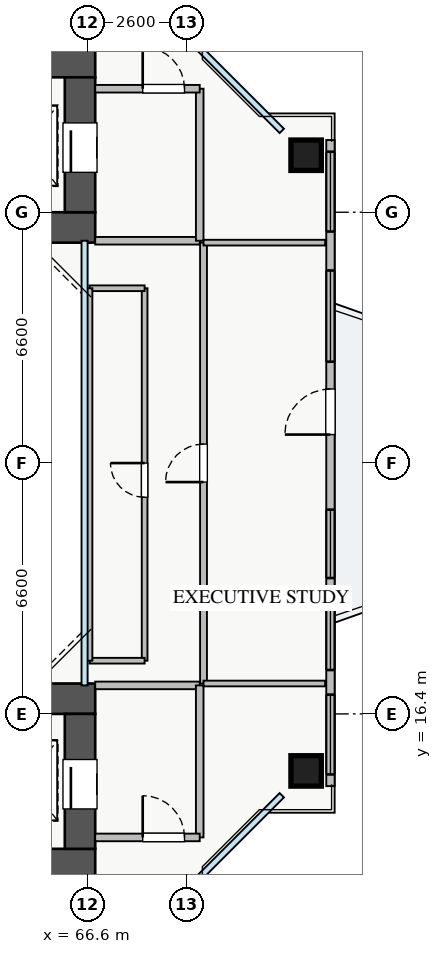
"""IFC4 building model, lengths in metres.
Left out: names, types, materials, properties, quantities, classifications, styles, units other than length and angle.
Written with IfcOpenShell. Run it as: python <this file> out.ifc"""

import sys

from ifc_helpers import new_model, si_unit, direction, frame, frame_2d, origin, origin_2d, place, context, subcontext, project, spatial, rectangle, extrude, source, transform, mapped, element, fill, save


model = new_model("IFC4")
c1 = context("Model", 3, precision=1e-05, world=origin(), true_north=direction((0.0, 1.0)))
c2 = subcontext(c1, "Body", "Model", "MODEL_VIEW")
j1 = project(units=[si_unit("LENGTHUNIT", "METRE"), si_unit("PLANEANGLEUNIT", "RADIAN")], contexts=[c1])
p1 = place(None, origin())
s1 = spatial("IfcSite", under=j1, at=p1, CompositionType="ELEMENT")
p2 = place(p1, origin())
s2 = spatial("IfcBuilding", under=s1, at=p2, CompositionType="ELEMENT")
p3 = place(p2, frame((0.0, 0.0, 79.5)))
s3 = spatial("IfcBuildingStorey", under=s2, at=p3, CompositionType="ELEMENT", Elevation=79.5)
p4 = place(p3, frame((54.2, 29.2, 0.0), z_axis=(0.0, 0.0, 1.0), x_axis=(1.0, 0.0, 0.0)))
e1 = element("IfcWall", 1, at=p4, inside=s3, PredefinedType="SHEAR", context=c2, shape_type="SweptSolid", body=[
    extrude(rectangle(XDim=12.6, YDim=0.8, at=frame_2d((6.3, 0.0))), origin(), (0.0, 0.0, 1.0), 3.25),
])
p5 = place(p3, frame((54.2, 33.55, 0.0), z_axis=(0.0, 0.0, 1.0), x_axis=(1.0, 0.0, 0.0)))
e2 = element("IfcWall", 2, at=p5, inside=s3, PredefinedType="SHEAR", context=c2, shape_type="SweptSolid", body=[
    extrude(rectangle(XDim=12.6, YDim=0.8, at=frame_2d((6.3, 0.0))), origin(), (0.0, 0.0, 1.0), 3.25),
])
p6 = place(p5, frame((8.2, 0.0, 0.0)))
e3 = element("IfcOpeningElement", 3, at=p6, cuts=e2, PredefinedType="OPENING", context=c2, shape_type="SweptSolid", body=[
    extrude(rectangle(XDim=1.1, YDim=2.05, at=frame_2d((0.55, 1.025))), frame((0.0, 0.41, 0.0), z_axis=(0.0, -1.0, 0.0), x_axis=(1.0, 0.0, 0.0)), (0.0, 0.0, 1.0), 0.82),
])
p7 = place(p3, frame((66.4, 29.6, 0.0), z_axis=(0.0, 0.0, 1.0), x_axis=(0.0, 1.0, 0.0)))
e4 = element("IfcWall", 4, at=p7, inside=s3, PredefinedType="SHEAR", context=c2, shape_type="SweptSolid", body=[
    extrude(rectangle(XDim=3.55, YDim=0.8, at=frame_2d((1.775, 0.0))), origin(), (0.0, 0.0, 1.0), 3.25),
])
p8 = place(p7, frame((1.05, 0.0, 0.0)))
e5 = element("IfcOpeningElement", 5, at=p8, cuts=e4, PredefinedType="OPENING", context=c2, shape_type="SweptSolid", body=[
    extrude(rectangle(XDim=1.3, YDim=2.05, at=frame_2d((0.65, 1.025))), frame((0.0, 0.41, 0.0), z_axis=(0.0, -1.0, 0.0), x_axis=(1.0, 0.0, 0.0)), (0.0, 0.0, 1.0), 0.82),
])
p9 = place(p3, frame((54.2, 12.45, 0.0), z_axis=(0.0, 0.0, 1.0), x_axis=(1.0, 0.0, 0.0)))
e6 = element("IfcWall", 6, at=p9, inside=s3, PredefinedType="SHEAR", context=c2, shape_type="SweptSolid", body=[
    extrude(rectangle(XDim=12.6, YDim=0.8, at=frame_2d((6.3, 0.0))), origin(), (0.0, 0.0, 1.0), 3.25),
])
p10 = place(p9, frame((8.2, 0.0, 0.0)))
e7 = element("IfcOpeningElement", 7, at=p10, cuts=e6, PredefinedType="OPENING", context=c2, shape_type="SweptSolid", body=[
    extrude(rectangle(XDim=1.1, YDim=2.05, at=frame_2d((0.55, 1.025))), frame((0.0, 0.41, 0.0), z_axis=(0.0, -1.0, 0.0), x_axis=(1.0, 0.0, 0.0)), (0.0, 0.0, 1.0), 0.82),
])
p11 = place(p3, frame((54.2, 16.8, 0.0), z_axis=(0.0, 0.0, 1.0), x_axis=(1.0, 0.0, 0.0)))
e8 = element("IfcWall", 8, at=p11, inside=s3, PredefinedType="SHEAR", context=c2, shape_type="SweptSolid", body=[
    extrude(rectangle(XDim=12.6, YDim=0.8, at=frame_2d((6.3, 0.0))), origin(), (0.0, 0.0, 1.0), 3.25),
])
p12 = place(p3, frame((66.4, 12.85, 0.0), z_axis=(0.0, 0.0, 1.0), x_axis=(0.0, 1.0, 0.0)))
e9 = element("IfcWall", 9, at=p12, inside=s3, PredefinedType="SHEAR", context=c2, shape_type="SweptSolid", body=[
    extrude(rectangle(XDim=3.55, YDim=0.8, at=frame_2d((1.775, 0.0))), origin(), (0.0, 0.0, 1.0), 3.25),
])
p13 = place(p12, frame((1.05, 0.0, 0.0)))
e10 = element("IfcOpeningElement", 10, at=p13, cuts=e9, PredefinedType="OPENING", context=c2, shape_type="SweptSolid", body=[
    extrude(rectangle(XDim=1.3, YDim=2.05, at=frame_2d((0.65, 1.025))), frame((0.0, 0.41, 0.0), z_axis=(0.0, -1.0, 0.0), x_axis=(1.0, 0.0, 0.0)), (0.0, 0.0, 1.0), 0.82),
])
m1 = source(origin(), c2, "Body", "SweptSolid", [
    extrude(rectangle(XDim=0.8, YDim=0.8, at=origin_2d()), origin(), (0.0, 0.0, 1.0), 3.25),
])
for number, where, z_axis, x_axis in (
    (11, (72.35, 14.9, 0.0), (0.0, 0.0, 1.0), (1.0, 0.0, 0.0)),
    (12, (72.35, 31.1, 0.0), (0.0, 0.0, 1.0), (1.0, 0.0, 0.0)),
):
    element("IfcColumn", number, at=place(p3, frame(where, z_axis=z_axis, x_axis=x_axis)), inside=s3, PredefinedType="COLUMN", context=c2, shape_type="MappedRepresentation", body=[
        mapped(m1, transform((0.0, 0.0, 0.0), x_axis=(1.0, 0.0, 0.0), y_axis=(0.0, 1.0, 0.0), z_axis=(0.0, 0.0, 1.0), scale=1.0)),
    ])
p14 = place(p3, frame((72.99, 14.5, 0.0), z_axis=(0.0, 0.0, 1.0), x_axis=(0.0, 1.0, 0.0)))
e13 = element("IfcWall", 13, at=p14, inside=s3, PredefinedType="STANDARD", context=c2, shape_type="SweptSolid", body=[
    extrude(rectangle(XDim=17.0, YDim=0.22, at=frame_2d((8.5, 0.0))), origin(), (0.0, 0.0, 1.0), 2.61),
])
p15 = place(p14, frame((9.25, 0.0, 0.0)))
e14 = element("IfcOpeningElement", 14, at=p15, cuts=e13, PredefinedType="OPENING", context=c2, shape_type="SweptSolid", body=[
    extrude(rectangle(XDim=1.2, YDim=2.1, at=frame_2d((0.6, 1.05))), frame((0.0, 0.12, 0.0), z_axis=(0.0, -1.0, 0.0), x_axis=(1.0, 0.0, 0.0)), (0.0, 0.0, 1.0), 0.24),
])
p16 = place(p14, frame((0.308, 0.0, 0.9)))
e15 = element("IfcOpeningElement", 15, at=p16, cuts=e13, PredefinedType="OPENING", context=c2, shape_type="SweptSolid", body=[
    extrude(rectangle(XDim=2.1, YDim=1.5, at=frame_2d((1.05, 0.75))), frame((0.0, 0.12, 0.0), z_axis=(0.0, -1.0, 0.0), x_axis=(1.0, 0.0, 0.0)), (0.0, 0.0, 1.0), 0.24),
])
p17 = place(p14, frame((5.475, 0.0, 0.9)))
e16 = element("IfcOpeningElement", 16, at=p17, cuts=e13, PredefinedType="OPENING", context=c2, shape_type="SweptSolid", body=[
    extrude(rectangle(XDim=1.8, YDim=1.45, at=frame_2d((0.9, 0.725))), frame((0.0, 0.12, 0.0), z_axis=(0.0, -1.0, 0.0), x_axis=(1.0, 0.0, 0.0)), (0.0, 0.0, 1.0), 0.24),
])
p18 = place(p14, frame((14.593, 0.0, 0.9)))
e17 = element("IfcOpeningElement", 17, at=p18, cuts=e13, PredefinedType="OPENING", context=c2, shape_type="SweptSolid", body=[
    extrude(rectangle(XDim=2.1, YDim=1.5, at=frame_2d((1.05, 0.75))), frame((0.0, 0.12, 0.0), z_axis=(0.0, -1.0, 0.0), x_axis=(1.0, 0.0, 0.0)), (0.0, 0.0, 1.0), 0.24),
])
p19 = place(p14, frame((3.055, 0.0, 0.9)))
e18 = element("IfcOpeningElement", 18, at=p19, cuts=e13, PredefinedType="OPENING", context=c2, shape_type="SweptSolid", body=[
    extrude(rectangle(XDim=2.1, YDim=1.5, at=frame_2d((1.05, 0.75))), frame((0.0, 0.12, 0.0), z_axis=(0.0, -1.0, 0.0), x_axis=(1.0, 0.0, 0.0)), (0.0, 0.0, 1.0), 0.24),
])
p20 = place(p14, frame((11.167, 0.0, 0.9)))
e19 = element("IfcOpeningElement", 19, at=p20, cuts=e13, PredefinedType="OPENING", context=c2, shape_type="SweptSolid", body=[
    extrude(rectangle(XDim=2.4, YDim=1.5, at=frame_2d((1.2, 0.75))), frame((0.0, 0.12, 0.0), z_axis=(0.0, -1.0, 0.0), x_axis=(1.0, 0.0, 0.0)), (0.0, 0.0, 1.0), 0.24),
])
p21 = place(p3, frame((66.8, 28.85, 0.0), z_axis=(0.0, 0.0, 1.0), x_axis=(1.0, 0.0, 0.0)))
e20 = element("IfcWall", 20, at=p21, inside=s3, PredefinedType="PARTITIONING", context=c2, shape_type="SweptSolid", body=[
    extrude(rectangle(XDim=2.75, YDim=0.2, at=frame_2d((1.375, 0.0))), origin(), (0.0, 0.0, 1.0), 3.07),
])
p22 = place(p3, frame((69.55, 28.85, 0.0), z_axis=(0.0, 0.0, 1.0), x_axis=(0.0, 1.0, 0.0)))
e21 = element("IfcWall", 21, at=p22, inside=s3, PredefinedType="PARTITIONING", context=c2, shape_type="SweptSolid", body=[
    extrude(rectangle(XDim=4.0, YDim=0.2, at=frame_2d((2.0, 0.0))), origin(), (0.0, 0.0, 1.0), 3.07),
])
p23 = place(p3, frame((66.8, 32.85, 0.0), z_axis=(0.0, 0.0, 1.0), x_axis=(1.0, 0.0, 0.0)))
e22 = element("IfcWall", 22, at=p23, inside=s3, PredefinedType="PARTITIONING", context=c2, shape_type="SweptSolid", body=[
    extrude(rectangle(XDim=2.75, YDim=0.2, at=frame_2d((1.375, 0.0))), origin(), (0.0, 0.0, 1.0), 3.07),
])
p24 = place(p23, frame((1.25, 0.0, 0.0)))
e23 = element("IfcOpeningElement", 23, at=p24, cuts=e22, PredefinedType="OPENING", context=c2, shape_type="SweptSolid", body=[
    extrude(rectangle(XDim=1.1, YDim=2.05, at=frame_2d((0.55, 1.025))), frame((0.0, 0.11, 0.0), z_axis=(0.0, -1.0, 0.0), x_axis=(1.0, 0.0, 0.0)), (0.0, 0.0, 1.0), 0.22),
])
p25 = place(p3, frame((66.8, 17.15, 0.0), z_axis=(0.0, 0.0, 1.0), x_axis=(1.0, 0.0, 0.0)))
e24 = element("IfcWall", 24, at=p25, inside=s3, PredefinedType="PARTITIONING", context=c2, shape_type="SweptSolid", body=[
    extrude(rectangle(XDim=2.75, YDim=0.2, at=frame_2d((1.375, 0.0))), origin(), (0.0, 0.0, 1.0), 3.07),
])
p26 = place(p3, frame((69.55, 13.15, 0.0), z_axis=(0.0, 0.0, 1.0), x_axis=(0.0, 1.0, 0.0)))
e25 = element("IfcWall", 25, at=p26, inside=s3, PredefinedType="PARTITIONING", context=c2, shape_type="SweptSolid", body=[
    extrude(rectangle(XDim=4.0, YDim=0.2, at=frame_2d((2.0, 0.0))), origin(), (0.0, 0.0, 1.0), 3.07),
])
p27 = place(p3, frame((66.8, 13.15, 0.0), z_axis=(0.0, 0.0, 1.0), x_axis=(1.0, 0.0, 0.0)))
e26 = element("IfcWall", 26, at=p27, inside=s3, PredefinedType="PARTITIONING", context=c2, shape_type="SweptSolid", body=[
    extrude(rectangle(XDim=2.75, YDim=0.2, at=frame_2d((1.375, 0.0))), origin(), (0.0, 0.0, 1.0), 3.07),
])
p28 = place(p27, frame((1.25, 0.0, 0.0)))
e27 = element("IfcOpeningElement", 27, at=p28, cuts=e26, PredefinedType="OPENING", context=c2, shape_type="SweptSolid", body=[
    extrude(rectangle(XDim=1.1, YDim=2.05, at=frame_2d((0.55, 1.025))), frame((0.0, 0.11, 0.0), z_axis=(0.0, -1.0, 0.0), x_axis=(1.0, 0.0, 0.0)), (0.0, 0.0, 1.0), 0.22),
])
p29 = place(p3, frame((69.65, 17.2, 0.0), z_axis=(0.0, 0.0, 1.0), x_axis=(0.0, 1.0, 0.0)))
e28 = element("IfcWall", 28, at=p29, inside=s3, PredefinedType="PARTITIONING", context=c2, shape_type="SweptSolid", body=[
    extrude(rectangle(XDim=11.6, YDim=0.18, at=frame_2d((5.8, 0.0))), origin(), (0.0, 0.0, 1.0), 3.07),
])
p30 = place(p29, frame((5.3, 0.0, 0.0)))
e29 = element("IfcOpeningElement", 29, at=p30, cuts=e28, PredefinedType="OPENING", context=c2, shape_type="SweptSolid", body=[
    extrude(rectangle(XDim=1.0, YDim=2.05, at=frame_2d((0.5, 1.025))), frame((0.0, 0.1, 0.0), z_axis=(0.0, -1.0, 0.0), x_axis=(1.0, 0.0, 0.0)), (0.0, 0.0, 1.0), 0.2),
])
for number, where, z_axis, x_axis in (
    (30, (69.65, 17.2, 0.0), (0.0, 0.0, 1.0), (1.0, 0.0, 0.0)),
    (31, (69.65, 28.8, 0.0), (0.0, 0.0, 1.0), (1.0, 0.0, 0.0)),
):
    element("IfcWall", number, at=place(p3, frame(where, z_axis=z_axis, x_axis=x_axis)), inside=s3, PredefinedType="PARTITIONING", context=c2, shape_type="SweptSolid", body=[
        extrude(rectangle(XDim=3.2, YDim=0.15, at=frame_2d((1.6, 0.0))), origin(), (0.0, 0.0, 1.0), 3.07),
    ])
p31 = place(p3, frame((68.1, 17.8, 0.0), z_axis=(0.0, 0.0, 1.0), x_axis=(0.0, 1.0, 0.0)))
e32 = element("IfcWall", 32, at=p31, inside=s3, PredefinedType="PARTITIONING", context=c2, shape_type="SweptSolid", body=[
    extrude(rectangle(XDim=9.8, YDim=0.15, at=frame_2d((4.9, 0.0))), origin(), (0.0, 0.0, 1.0), 3.07),
])
p32 = place(p31, frame((4.3, 0.0, 0.0)))
e33 = element("IfcOpeningElement", 33, at=p32, cuts=e32, PredefinedType="OPENING", context=c2, shape_type="SweptSolid", body=[
    extrude(rectangle(XDim=0.9, YDim=2.05, at=frame_2d((0.45, 1.025))), frame((0.0, 0.085, 0.0), z_axis=(0.0, -1.0, 0.0), x_axis=(1.0, 0.0, 0.0)), (0.0, 0.0, 1.0), 0.17),
])
p33 = place(p3, frame((66.65, 27.6, 0.0), z_axis=(0.0, 0.0, 1.0), x_axis=(1.0, 0.0, 0.0)))
e34 = element("IfcWall", 34, at=p33, inside=s3, PredefinedType="PARTITIONING", context=c2, shape_type="SweptSolid", body=[
    extrude(rectangle(XDim=1.45, YDim=0.15, at=frame_2d((0.725, 0.0))), origin(), (0.0, 0.0, 1.0), 2.765),
])
p34 = place(p3, frame((66.65, 17.8, 0.0), z_axis=(0.0, 0.0, 1.0), x_axis=(1.0, 0.0, 0.0)))
e35 = element("IfcWall", 35, at=p34, inside=s3, PredefinedType="PARTITIONING", context=c2, shape_type="SweptSolid", body=[
    extrude(rectangle(XDim=1.45, YDim=0.15, at=frame_2d((0.725, 0.0))), origin(), (0.0, 0.0, 1.0), 3.07),
])
p35 = place(p3, frame((66.65, 17.8, 0.0), z_axis=(0.0, 0.0, 1.0), x_axis=(0.0, 1.0, 0.0)))
e36 = element("IfcWall", 36, at=p35, inside=s3, PredefinedType="PARTITIONING", context=c2, shape_type="SweptSolid", body=[
    extrude(rectangle(XDim=9.8, YDim=0.15, at=frame_2d((4.9, 0.0))), origin(), (0.0, 0.0, 1.0), 2.665),
])
m2 = source(origin(), c2, "Body", "SweptSolid", [
    extrude(rectangle(XDim=1.2, YDim=2.1, at=frame_2d((0.6, 1.05))), frame((0.0, 0.025, 0.0), z_axis=(0.0, -1.0, 0.0), x_axis=(1.0, 0.0, 0.0)), (0.0, 0.0, 1.0), 0.05),
])
p36 = place(p15, origin())
e37 = element("IfcDoor", 37, at=p36, inside=s3, OperationType="SINGLE_SWING_LEFT", PredefinedType="DOOR", context=c2, shape_type="MappedRepresentation", body=[
    mapped(m2, transform((0.0, 0.0, 0.0), x_axis=(1.0, 0.0, 0.0), y_axis=(0.0, 1.0, 0.0), z_axis=(0.0, 0.0, 1.0), scale=1.0)),
])
fill(e14, e37)
m3 = source(origin(), c2, "Body", "SweptSolid", [
    extrude(rectangle(XDim=2.1, YDim=1.5, at=frame_2d((1.05, 0.75))), frame((0.0, 0.03, 0.0), z_axis=(0.0, -1.0, 0.0), x_axis=(1.0, 0.0, 0.0)), (0.0, 0.0, 1.0), 0.06),
])
p37 = place(p16, origin())
e38 = element("IfcWindow", 38, at=p37, inside=s3, PartitioningType="TRIPLE_PANEL_VERTICAL", PredefinedType="WINDOW", context=c2, shape_type="MappedRepresentation", body=[
    mapped(m3, transform((0.0, 0.0, 0.0), x_axis=(1.0, 0.0, 0.0), y_axis=(0.0, 1.0, 0.0), z_axis=(0.0, 0.0, 1.0), scale=1.0)),
])
fill(e15, e38)
m4 = source(origin(), c2, "Body", "SweptSolid", [
    extrude(rectangle(XDim=1.8, YDim=1.45, at=frame_2d((0.9, 0.725))), frame((0.0, 0.03, 0.0), z_axis=(0.0, -1.0, 0.0), x_axis=(1.0, 0.0, 0.0)), (0.0, 0.0, 1.0), 0.06),
])
p38 = place(p17, origin())
e39 = element("IfcWindow", 39, at=p38, inside=s3, PartitioningType="DOUBLE_PANEL_VERTICAL", PredefinedType="WINDOW", context=c2, shape_type="MappedRepresentation", body=[
    mapped(m4, transform((0.0, 0.0, 0.0), x_axis=(1.0, 0.0, 0.0), y_axis=(0.0, 1.0, 0.0), z_axis=(0.0, 0.0, 1.0), scale=1.0)),
])
fill(e16, e39)
p39 = place(p18, origin())
e40 = element("IfcWindow", 40, at=p39, inside=s3, PartitioningType="TRIPLE_PANEL_VERTICAL", PredefinedType="WINDOW", context=c2, shape_type="MappedRepresentation", body=[
    mapped(m3, transform((0.0, 0.0, 0.0), x_axis=(1.0, 0.0, 0.0), y_axis=(0.0, 1.0, 0.0), z_axis=(0.0, 0.0, 1.0), scale=1.0)),
])
fill(e17, e40)
m5 = source(origin(), c2, "Body", "SweptSolid", [
    extrude(rectangle(XDim=1.3, YDim=2.05, at=frame_2d((0.65, 1.025))), frame((0.0, 0.025, 0.0), z_axis=(0.0, -1.0, 0.0), x_axis=(1.0, 0.0, 0.0)), (0.0, 0.0, 1.0), 0.05),
])
p40 = place(p8, origin())
e41 = element("IfcDoor", 41, at=p40, inside=s3, OperationType="SLIDING_TO_LEFT", PredefinedType="DOOR", context=c2, shape_type="MappedRepresentation", body=[
    mapped(m5, transform((0.0, 0.0, 0.0), x_axis=(1.0, 0.0, 0.0), y_axis=(0.0, 1.0, 0.0), z_axis=(0.0, 0.0, 1.0), scale=1.0)),
])
fill(e5, e41)
p41 = place(p13, origin())
e42 = element("IfcDoor", 42, at=p41, inside=s3, OperationType="SLIDING_TO_RIGHT", PredefinedType="DOOR", context=c2, shape_type="MappedRepresentation", body=[
    mapped(m5, transform((0.0, 0.0, 0.0), x_axis=(1.0, 0.0, 0.0), y_axis=(0.0, 1.0, 0.0), z_axis=(0.0, 0.0, 1.0), scale=1.0)),
])
fill(e10, e42)
m6 = source(origin(), c2, "Body", "SweptSolid", [
    extrude(rectangle(XDim=1.1, YDim=2.05, at=frame_2d((0.55, 1.025))), frame((0.0, 0.025, 0.0), z_axis=(0.0, -1.0, 0.0), x_axis=(1.0, 0.0, 0.0)), (0.0, 0.0, 1.0), 0.05),
])
p42 = place(p24, origin())
e43 = element("IfcDoor", 43, at=p42, inside=s3, OperationType="SINGLE_SWING_LEFT", PredefinedType="DOOR", context=c2, shape_type="MappedRepresentation", body=[
    mapped(m6, transform((0.0, 0.0, 0.0), x_axis=(1.0, 0.0, 0.0), y_axis=(0.0, 1.0, 0.0), z_axis=(0.0, 0.0, 1.0), scale=1.0)),
])
fill(e23, e43)
p43 = place(p28, origin())
e44 = element("IfcDoor", 44, at=p43, inside=s3, OperationType="SINGLE_SWING_LEFT", PredefinedType="DOOR", context=c2, shape_type="MappedRepresentation", body=[
    mapped(m6, transform((0.0, 0.0, 0.0), x_axis=(1.0, 0.0, 0.0), y_axis=(0.0, 1.0, 0.0), z_axis=(0.0, 0.0, 1.0), scale=1.0)),
])
fill(e27, e44)
m7 = source(origin(), c2, "Body", "SweptSolid", [
    extrude(rectangle(XDim=1.0, YDim=2.05, at=frame_2d((0.5, 1.025))), frame((0.0, 0.025, 0.0), z_axis=(0.0, -1.0, 0.0), x_axis=(1.0, 0.0, 0.0)), (0.0, 0.0, 1.0), 0.05),
])
p44 = place(p30, origin())
e45 = element("IfcDoor", 45, at=p44, inside=s3, OperationType="SINGLE_SWING_LEFT", PredefinedType="DOOR", context=c2, shape_type="MappedRepresentation", body=[
    mapped(m7, transform((0.0, 0.0, 0.0), x_axis=(1.0, 0.0, 0.0), y_axis=(0.0, 1.0, 0.0), z_axis=(0.0, 0.0, 1.0), scale=1.0)),
])
fill(e29, e45)
m8 = source(origin(), c2, "Body", "SweptSolid", [
    extrude(rectangle(XDim=0.9, YDim=2.05, at=frame_2d((0.45, 1.025))), frame((0.0, 0.025, 0.0), z_axis=(0.0, -1.0, 0.0), x_axis=(1.0, 0.0, 0.0)), (0.0, 0.0, 1.0), 0.05),
])
p45 = place(p32, origin())
e46 = element("IfcDoor", 46, at=p45, inside=s3, OperationType="SINGLE_SWING_RIGHT", PredefinedType="DOOR", context=c2, shape_type="MappedRepresentation", body=[
    mapped(m8, transform((0.0, 0.0, 0.0), x_axis=(1.0, 0.0, 0.0), y_axis=(0.0, 1.0, 0.0), z_axis=(0.0, 0.0, 1.0), scale=1.0)),
])
fill(e33, e46)
p46 = place(p19, origin())
e47 = element("IfcWindow", 47, at=p46, inside=s3, PartitioningType="TRIPLE_PANEL_VERTICAL", PredefinedType="WINDOW", context=c2, shape_type="MappedRepresentation", body=[
    mapped(m3, transform((0.0, 0.0, 0.0), x_axis=(1.0, 0.0, 0.0), y_axis=(0.0, 1.0, 0.0), z_axis=(0.0, 0.0, 1.0), scale=1.0)),
])
fill(e18, e47)
m9 = source(origin(), c2, "Body", "SweptSolid", [
    extrude(rectangle(XDim=2.4, YDim=1.5, at=frame_2d((1.2, 0.75))), frame((0.0, 0.03, 0.0), z_axis=(0.0, -1.0, 0.0), x_axis=(1.0, 0.0, 0.0)), (0.0, 0.0, 1.0), 0.06),
])
p47 = place(p20, origin())
e48 = element("IfcWindow", 48, at=p47, inside=s3, PartitioningType="TRIPLE_PANEL_VERTICAL", PredefinedType="WINDOW", context=c2, shape_type="MappedRepresentation", body=[
    mapped(m9, transform((0.0, 0.0, 0.0), x_axis=(1.0, 0.0, 0.0), y_axis=(0.0, 1.0, 0.0), z_axis=(0.0, 0.0, 1.0), scale=1.0)),
])
fill(e19, e48)
save(model, sys.argv[1])
